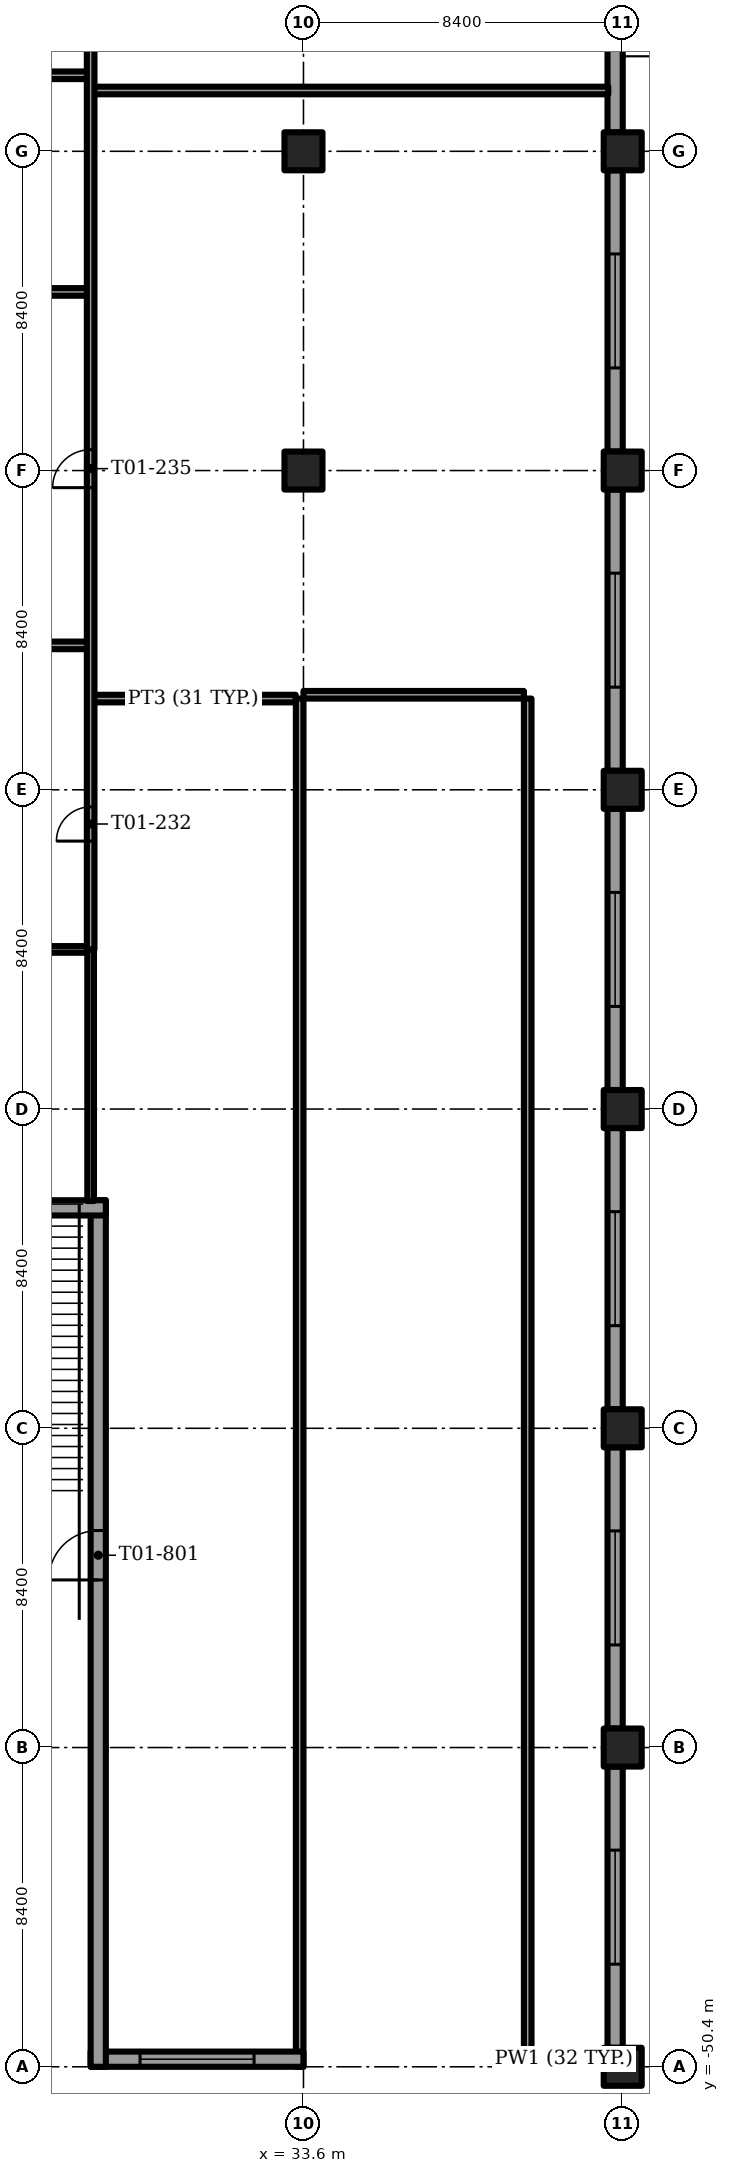
"""IFC4 building model, lengths in metres.
Left out: names, types, materials, properties, quantities, classifications, styles, units other than length and angle.
Written with IfcOpenShell. Run it as: python <this file> out.ifc"""

import sys

from ifc_helpers import new_model, si_unit, direction, frame, frame_2d, origin, origin_2d, place, context, subcontext, project, spatial, rectangle, extrude, element, fill, save


model = new_model("IFC4")
c1 = context("Model", 3, precision=1e-05, world=origin(), true_north=direction((0.0, 1.0)))
c2 = subcontext(c1, "Body", "Model", "MODEL_VIEW")
j1 = project(units=[si_unit("LENGTHUNIT", "METRE"), si_unit("PLANEANGLEUNIT", "RADIAN")], contexts=[c1])
p1 = place(None, origin())
s1 = spatial("IfcSite", under=j1, at=p1, CompositionType="ELEMENT")
p2 = place(p1, origin())
s2 = spatial("IfcBuilding", under=s1, at=p2, CompositionType="ELEMENT")
p3 = place(p2, frame((0.0, 0.0, 6.0)))
s3 = spatial("IfcBuildingStorey", under=s2, at=p3, CompositionType="ELEMENT", Elevation=6.0)
for number, where, z_axis, x_axis in (
    (1, (33.6, -8.4, -0.35), (0.0, 0.0, 1.0), (1.0, 0.0, 0.0)),
    (2, (33.6, 0.0, -0.35), (0.0, 0.0, 1.0), (1.0, 0.0, 0.0)),
    (3, (42.0, -50.4, -0.35), (0.0, 0.0, 1.0), (1.0, 0.0, 0.0)),
    (4, (42.0, -42.0, -0.35), (0.0, 0.0, 1.0), (1.0, 0.0, 0.0)),
    (5, (42.0, -33.6, -0.35), (0.0, 0.0, 1.0), (1.0, 0.0, 0.0)),
    (6, (42.0, -25.2, -0.35), (0.0, 0.0, 1.0), (1.0, 0.0, 0.0)),
    (7, (42.0, -16.8, -0.35), (0.0, 0.0, 1.0), (1.0, 0.0, 0.0)),
    (8, (42.0, -8.4, -0.35), (0.0, 0.0, 1.0), (1.0, 0.0, 0.0)),
    (9, (42.0, 0.0, -0.35), (0.0, 0.0, 1.0), (1.0, 0.0, 0.0)),
):
    element("IfcColumn", number, at=place(p3, frame(where, z_axis=z_axis, x_axis=x_axis)), inside=s3, PredefinedType="COLUMN", context=c2, shape_type="SweptSolid", body=[
        extrude(rectangle(XDim=1.0, YDim=1.0, at=origin_2d()), origin(), (0.0, 0.0, 1.0), 4.0),
    ])
p4 = place(p3, frame((41.5, -50.2, 0.0), z_axis=(0.0, 0.0, 1.0), x_axis=(-1.0, 0.0, 0.0)))
e10 = element("IfcWall", 10, at=p4, inside=s3, PredefinedType="SOLIDWALL", context=c2, shape_type="SweptSolid", body=[
    extrude(rectangle(XDim=2.1, YDim=0.4, at=frame_2d((1.05, 0.0))), origin(), (0.0, 0.0, 1.0), 3.65),
])
p5 = place(p3, frame((33.6, -50.2, 0.0), z_axis=(0.0, 0.0, 1.0), x_axis=(-1.0, 0.0, 0.0)))
e11 = element("IfcWall", 11, at=p5, inside=s3, PredefinedType="SOLIDWALL", context=c2, shape_type="SweptSolid", body=[
    extrude(rectangle(XDim=5.6, YDim=0.4, at=frame_2d((2.8, 0.0))), origin(), (0.0, 0.0, 1.0), 3.65),
])
p6 = place(p5, frame((1.3, 0.0, 1.0)))
e12 = element("IfcOpeningElement", 12, at=p6, cuts=e11, PredefinedType="OPENING", context=c2, shape_type="SweptSolid", body=[
    extrude(rectangle(XDim=3.0, YDim=2.2, at=frame_2d((1.5, 1.1))), frame((0.0, 0.2, 0.0), z_axis=(0.0, -1.0, 0.0), x_axis=(1.0, 0.0, 0.0)), (0.0, 0.0, 1.0), 0.4),
])
p7 = place(p3, frame((41.8, 7.9, 0.0), z_axis=(0.0, 0.0, 1.0), x_axis=(0.0, -1.0, 0.0)))
e13 = element("IfcWall", 13, at=p7, inside=s3, PredefinedType="SOLIDWALL", context=c2, shape_type="SweptSolid", body=[
    extrude(rectangle(XDim=7.4, YDim=0.4, at=frame_2d((3.7, 0.0))), origin(), (0.0, 0.0, 1.0), 3.65),
])
p8 = place(p7, frame((2.2, 0.0, 1.0)))
e14 = element("IfcOpeningElement", 14, at=p8, cuts=e13, PredefinedType="OPENING", context=c2, shape_type="SweptSolid", body=[
    extrude(rectangle(XDim=3.0, YDim=2.2, at=frame_2d((1.5, 1.1))), frame((0.0, 0.2, 0.0), z_axis=(0.0, -1.0, 0.0), x_axis=(1.0, 0.0, 0.0)), (0.0, 0.0, 1.0), 0.4),
])
p9 = place(p3, frame((41.8, -0.5, 0.0), z_axis=(0.0, 0.0, 1.0), x_axis=(0.0, -1.0, 0.0)))
e15 = element("IfcWall", 15, at=p9, inside=s3, PredefinedType="SOLIDWALL", context=c2, shape_type="SweptSolid", body=[
    extrude(rectangle(XDim=7.4, YDim=0.4, at=frame_2d((3.7, 0.0))), origin(), (0.0, 0.0, 1.0), 3.65),
])
p10 = place(p9, frame((2.2, 0.0, 1.0)))
e16 = element("IfcOpeningElement", 16, at=p10, cuts=e15, PredefinedType="OPENING", context=c2, shape_type="SweptSolid", body=[
    extrude(rectangle(XDim=3.0, YDim=2.2, at=frame_2d((1.5, 1.1))), frame((0.0, 0.2, 0.0), z_axis=(0.0, -1.0, 0.0), x_axis=(1.0, 0.0, 0.0)), (0.0, 0.0, 1.0), 0.4),
])
p11 = place(p3, frame((41.8, -8.9, 0.0), z_axis=(0.0, 0.0, 1.0), x_axis=(0.0, -1.0, 0.0)))
e17 = element("IfcWall", 17, at=p11, inside=s3, PredefinedType="SOLIDWALL", context=c2, shape_type="SweptSolid", body=[
    extrude(rectangle(XDim=7.4, YDim=0.4, at=frame_2d((3.7, 0.0))), origin(), (0.0, 0.0, 1.0), 3.65),
])
p12 = place(p11, frame((2.2, 0.0, 1.0)))
e18 = element("IfcOpeningElement", 18, at=p12, cuts=e17, PredefinedType="OPENING", context=c2, shape_type="SweptSolid", body=[
    extrude(rectangle(XDim=3.0, YDim=2.2, at=frame_2d((1.5, 1.1))), frame((0.0, 0.2, 0.0), z_axis=(0.0, -1.0, 0.0), x_axis=(1.0, 0.0, 0.0)), (0.0, 0.0, 1.0), 0.4),
])
p13 = place(p3, frame((41.8, -17.3, 0.0), z_axis=(0.0, 0.0, 1.0), x_axis=(0.0, -1.0, 0.0)))
e19 = element("IfcWall", 19, at=p13, inside=s3, PredefinedType="SOLIDWALL", context=c2, shape_type="SweptSolid", body=[
    extrude(rectangle(XDim=7.4, YDim=0.4, at=frame_2d((3.7, 0.0))), origin(), (0.0, 0.0, 1.0), 3.65),
])
p14 = place(p13, frame((2.2, 0.0, 1.0)))
e20 = element("IfcOpeningElement", 20, at=p14, cuts=e19, PredefinedType="OPENING", context=c2, shape_type="SweptSolid", body=[
    extrude(rectangle(XDim=3.0, YDim=2.2, at=frame_2d((1.5, 1.1))), frame((0.0, 0.2, 0.0), z_axis=(0.0, -1.0, 0.0), x_axis=(1.0, 0.0, 0.0)), (0.0, 0.0, 1.0), 0.4),
])
p15 = place(p3, frame((41.8, -25.7, 0.0), z_axis=(0.0, 0.0, 1.0), x_axis=(0.0, -1.0, 0.0)))
e21 = element("IfcWall", 21, at=p15, inside=s3, PredefinedType="SOLIDWALL", context=c2, shape_type="SweptSolid", body=[
    extrude(rectangle(XDim=7.4, YDim=0.4, at=frame_2d((3.7, 0.0))), origin(), (0.0, 0.0, 1.0), 3.65),
])
p16 = place(p15, frame((2.2, 0.0, 1.0)))
e22 = element("IfcOpeningElement", 22, at=p16, cuts=e21, PredefinedType="OPENING", context=c2, shape_type="SweptSolid", body=[
    extrude(rectangle(XDim=3.0, YDim=2.2, at=frame_2d((1.5, 1.1))), frame((0.0, 0.2, 0.0), z_axis=(0.0, -1.0, 0.0), x_axis=(1.0, 0.0, 0.0)), (0.0, 0.0, 1.0), 0.4),
])
p17 = place(p3, frame((41.8, -34.1, 0.0), z_axis=(0.0, 0.0, 1.0), x_axis=(0.0, -1.0, 0.0)))
e23 = element("IfcWall", 23, at=p17, inside=s3, PredefinedType="SOLIDWALL", context=c2, shape_type="SweptSolid", body=[
    extrude(rectangle(XDim=7.4, YDim=0.4, at=frame_2d((3.7, 0.0))), origin(), (0.0, 0.0, 1.0), 3.65),
])
p18 = place(p17, frame((2.2, 0.0, 1.0)))
e24 = element("IfcOpeningElement", 24, at=p18, cuts=e23, PredefinedType="OPENING", context=c2, shape_type="SweptSolid", body=[
    extrude(rectangle(XDim=3.0, YDim=2.2, at=frame_2d((1.5, 1.1))), frame((0.0, 0.2, 0.0), z_axis=(0.0, -1.0, 0.0), x_axis=(1.0, 0.0, 0.0)), (0.0, 0.0, 1.0), 0.4),
])
p19 = place(p3, frame((41.8, -42.5, 0.0), z_axis=(0.0, 0.0, 1.0), x_axis=(0.0, -1.0, 0.0)))
e25 = element("IfcWall", 25, at=p19, inside=s3, PredefinedType="SOLIDWALL", context=c2, shape_type="SweptSolid", body=[
    extrude(rectangle(XDim=7.4, YDim=0.4, at=frame_2d((3.7, 0.0))), origin(), (0.0, 0.0, 1.0), 3.65),
])
p20 = place(p19, frame((2.2, 0.0, 1.0)))
e26 = element("IfcOpeningElement", 26, at=p20, cuts=e25, PredefinedType="OPENING", context=c2, shape_type="SweptSolid", body=[
    extrude(rectangle(XDim=3.0, YDim=2.2, at=frame_2d((1.5, 1.1))), frame((0.0, 0.2, 0.0), z_axis=(0.0, -1.0, 0.0), x_axis=(1.0, 0.0, 0.0)), (0.0, 0.0, 1.0), 0.4),
])
p21 = place(p3, frame((28.2, -50.4, 0.0), z_axis=(0.0, 0.0, 1.0), x_axis=(0.0, 1.0, 0.0)))
e27 = element("IfcWall", 27, at=p21, inside=s3, PredefinedType="SOLIDWALL", context=c2, shape_type="SweptSolid", body=[
    extrude(rectangle(XDim=22.8, YDim=0.4, at=frame_2d((11.4, 0.0))), origin(), (0.0, 0.0, 1.0), 3.65),
])
p22 = place(p21, frame((12.81, 0.0, 0.0)))
e28 = element("IfcOpeningElement", 28, at=p22, cuts=e27, PredefinedType="OPENING", context=c2, shape_type="SweptSolid", body=[
    extrude(rectangle(XDim=1.3, YDim=2.4, at=frame_2d((0.65, 1.2))), frame((0.0, 0.2, 0.0), z_axis=(0.0, -1.0, 0.0), x_axis=(1.0, 0.0, 0.0)), (0.0, 0.0, 1.0), 0.4),
])
p23 = place(p3, frame((13.6, -27.8, 0.0), z_axis=(0.0, 0.0, 1.0), x_axis=(1.0, 0.0, 0.0)))
e29 = element("IfcWall", 29, at=p23, inside=s3, PredefinedType="SOLIDWALL", context=c2, shape_type="SweptSolid", body=[
    extrude(rectangle(XDim=14.8, YDim=0.4, at=frame_2d((7.4, 0.0))), origin(), (0.0, 0.0, 1.0), 3.65),
])
p24 = place(p3, frame((39.5, -50.4, 0.0), z_axis=(0.0, 0.0, 1.0), x_axis=(0.0, 1.0, 0.0)))
e30 = element("IfcWall", 30, at=p24, inside=s3, PredefinedType="PARAPET", context=c2, shape_type="SweptSolid", body=[
    extrude(rectangle(XDim=36.0, YDim=0.2, at=frame_2d((18.0, 0.0))), origin(), (0.0, 0.0, 1.0), 1.1),
])
p25 = place(p3, frame((39.4, -14.3, 0.0), z_axis=(0.0, 0.0, 1.0), x_axis=(-1.0, 0.0, 0.0)))
e31 = element("IfcWall", 31, at=p25, inside=s3, PredefinedType="PARAPET", context=c2, shape_type="SweptSolid", body=[
    extrude(rectangle(XDim=5.8, YDim=0.2, at=frame_2d((2.9, 0.0))), origin(), (0.0, 0.0, 1.0), 1.1),
])
p26 = place(p3, frame((33.5, -14.4, 0.0), z_axis=(0.0, 0.0, 1.0), x_axis=(0.0, -1.0, 0.0)))
e32 = element("IfcWall", 32, at=p26, inside=s3, PredefinedType="PARAPET", context=c2, shape_type="SweptSolid", body=[
    extrude(rectangle(XDim=36.0, YDim=0.2, at=frame_2d((18.0, 0.0))), origin(), (0.0, 0.0, 1.0), 1.1),
])
p27 = place(p3, frame((14.0, -21.0, 0.0), z_axis=(0.0, 0.0, 1.0), x_axis=(1.0, 0.0, 0.0)))
e33 = element("IfcWall", 33, at=p27, inside=s3, PredefinedType="PARTITIONING", context=c2, shape_type="SweptSolid", body=[
    extrude(rectangle(XDim=14.0, YDim=0.175, at=frame_2d((7.0, 0.0))), origin(), (0.0, 0.0, 1.0), 3.65),
])
p28 = place(p27, frame((6.55, 0.0, 0.0)))
e34 = element("IfcOpeningElement", 34, at=p28, cuts=e33, PredefinedType="OPENING", context=c2, shape_type="SweptSolid", body=[
    extrude(rectangle(XDim=0.9, YDim=2.1, at=frame_2d((0.45, 1.05))), frame((0.0, 0.087, 0.0), z_axis=(0.0, -1.0, 0.0), x_axis=(1.0, 0.0, 0.0)), (0.0, 0.0, 1.0), 0.175),
])
p29 = place(p3, frame((28.0, -27.62, 0.0), z_axis=(0.0, 0.0, 1.0), x_axis=(0.0, 1.0, 0.0)))
e35 = element("IfcWall", 35, at=p29, inside=s3, PredefinedType="PARTITIONING", context=c2, shape_type="SweptSolid", body=[
    extrude(rectangle(XDim=6.62, YDim=0.175, at=frame_2d((3.31, 0.0))), origin(), (0.0, 0.0, 1.0), 3.65),
])
p30 = place(p3, frame((28.0, -14.4, 0.0), z_axis=(0.0, 0.0, 1.0), x_axis=(1.0, 0.0, 0.0)))
e36 = element("IfcWall", 36, at=p30, inside=s3, PredefinedType="PARTITIONING", context=c2, shape_type="SweptSolid", body=[
    extrude(rectangle(XDim=5.395, YDim=0.2, at=frame_2d((2.698, 0.0))), origin(), (0.0, 0.0, 1.0), 3.65),
])
for number, where, z_axis, x_axis in (
    (37, (14.0, -13.0, 0.0), (0.0, 0.0, 1.0), (1.0, 0.0, 0.0)),
    (38, (14.0, -3.7, 0.0), (0.0, 0.0, 1.0), (1.0, 0.0, 0.0)),
):
    element("IfcWall", number, at=place(p3, frame(where, z_axis=z_axis, x_axis=x_axis)), inside=s3, PredefinedType="PARTITIONING", context=c2, shape_type="SweptSolid", body=[
        extrude(rectangle(XDim=14.0, YDim=0.2, at=frame_2d((7.0, 0.0))), origin(), (0.0, 0.0, 1.0), 2.8),
    ])
p31 = place(p3, frame((28.0, 1.6, 0.0), z_axis=(0.0, 0.0, 1.0), x_axis=(1.0, 0.0, 0.0)))
e39 = element("IfcWall", 39, at=p31, inside=s3, PredefinedType="PARTITIONING", context=c2, shape_type="SweptSolid", body=[
    extrude(rectangle(XDim=13.62, YDim=0.2, at=frame_2d((6.81, 0.0))), origin(), (0.0, 0.0, 1.0), 3.65),
])
p32 = place(p3, frame((14.0, 2.0, 0.0), z_axis=(0.0, 0.0, 1.0), x_axis=(1.0, 0.0, 0.0)))
e40 = element("IfcWall", 40, at=p32, inside=s3, PredefinedType="PARTITIONING", context=c2, shape_type="SweptSolid", body=[
    extrude(rectangle(XDim=14.0, YDim=0.2, at=frame_2d((7.0, 0.0))), origin(), (0.0, 0.0, 1.0), 2.8),
])
p33 = place(p3, frame((28.0, -21.0, 0.0), z_axis=(0.0, 0.0, 1.0), x_axis=(0.0, 1.0, 0.0)))
e41 = element("IfcWall", 41, at=p33, inside=s3, PredefinedType="PARTITIONING", context=c2, shape_type="SweptSolid", body=[
    extrude(rectangle(XDim=37.8, YDim=0.2, at=frame_2d((18.9, 0.0))), origin(), (0.0, 0.0, 1.0), 3.65),
])
p34 = place(p33, frame((2.85, 0.0, 0.0)))
e42 = element("IfcOpeningElement", 42, at=p34, cuts=e41, PredefinedType="OPENING", context=c2, shape_type="SweptSolid", body=[
    extrude(rectangle(XDim=0.9, YDim=2.1, at=frame_2d((0.45, 1.05))), frame((0.0, 0.1, 0.0), z_axis=(0.0, -1.0, 0.0), x_axis=(1.0, 0.0, 0.0)), (0.0, 0.0, 1.0), 0.2),
])
p35 = place(p33, frame((12.15, 0.0, 0.0)))
e43 = element("IfcOpeningElement", 43, at=p35, cuts=e41, PredefinedType="OPENING", context=c2, shape_type="SweptSolid", body=[
    extrude(rectangle(XDim=1.0, YDim=2.1, at=frame_2d((0.5, 1.05))), frame((0.0, 0.1, 0.0), z_axis=(0.0, -1.0, 0.0), x_axis=(1.0, 0.0, 0.0)), (0.0, 0.0, 1.0), 0.2),
])
p36 = place(p6, origin())
e44 = element("IfcWindow", 44, at=p36, inside=s3, PartitioningType="SINGLE_PANEL", PredefinedType="WINDOW", context=c2, shape_type="SweptSolid", body=[
    extrude(rectangle(XDim=3.0, YDim=2.2, at=frame_2d((1.5, 1.1))), frame((0.0, 0.03, 0.0), z_axis=(0.0, -1.0, 0.0), x_axis=(1.0, 0.0, 0.0)), (0.0, 0.0, 1.0), 0.06),
])
fill(e12, e44)
p37 = place(p10, origin())
e45 = element("IfcWindow", 45, at=p37, inside=s3, PartitioningType="SINGLE_PANEL", PredefinedType="WINDOW", context=c2, shape_type="SweptSolid", body=[
    extrude(rectangle(XDim=3.0, YDim=2.2, at=frame_2d((1.5, 1.1))), frame((0.0, 0.03, 0.0), z_axis=(0.0, -1.0, 0.0), x_axis=(1.0, 0.0, 0.0)), (0.0, 0.0, 1.0), 0.06),
])
fill(e16, e45)
p38 = place(p12, origin())
e46 = element("IfcWindow", 46, at=p38, inside=s3, PartitioningType="SINGLE_PANEL", PredefinedType="WINDOW", context=c2, shape_type="SweptSolid", body=[
    extrude(rectangle(XDim=3.0, YDim=2.2, at=frame_2d((1.5, 1.1))), frame((0.0, 0.03, 0.0), z_axis=(0.0, -1.0, 0.0), x_axis=(1.0, 0.0, 0.0)), (0.0, 0.0, 1.0), 0.06),
])
fill(e18, e46)
p39 = place(p14, origin())
e47 = element("IfcWindow", 47, at=p39, inside=s3, PartitioningType="SINGLE_PANEL", PredefinedType="WINDOW", context=c2, shape_type="SweptSolid", body=[
    extrude(rectangle(XDim=3.0, YDim=2.2, at=frame_2d((1.5, 1.1))), frame((0.0, 0.03, 0.0), z_axis=(0.0, -1.0, 0.0), x_axis=(1.0, 0.0, 0.0)), (0.0, 0.0, 1.0), 0.06),
])
fill(e20, e47)
p40 = place(p16, origin())
e48 = element("IfcWindow", 48, at=p40, inside=s3, PartitioningType="SINGLE_PANEL", PredefinedType="WINDOW", context=c2, shape_type="SweptSolid", body=[
    extrude(rectangle(XDim=3.0, YDim=2.2, at=frame_2d((1.5, 1.1))), frame((0.0, 0.03, 0.0), z_axis=(0.0, -1.0, 0.0), x_axis=(1.0, 0.0, 0.0)), (0.0, 0.0, 1.0), 0.06),
])
fill(e22, e48)
p41 = place(p18, origin())
e49 = element("IfcWindow", 49, at=p41, inside=s3, PartitioningType="SINGLE_PANEL", PredefinedType="WINDOW", context=c2, shape_type="SweptSolid", body=[
    extrude(rectangle(XDim=3.0, YDim=2.2, at=frame_2d((1.5, 1.1))), frame((0.0, 0.03, 0.0), z_axis=(0.0, -1.0, 0.0), x_axis=(1.0, 0.0, 0.0)), (0.0, 0.0, 1.0), 0.06),
])
fill(e24, e49)
p42 = place(p20, origin())
e50 = element("IfcWindow", 50, at=p42, inside=s3, PartitioningType="SINGLE_PANEL", PredefinedType="WINDOW", context=c2, shape_type="SweptSolid", body=[
    extrude(rectangle(XDim=3.0, YDim=2.2, at=frame_2d((1.5, 1.1))), frame((0.0, 0.03, 0.0), z_axis=(0.0, -1.0, 0.0), x_axis=(1.0, 0.0, 0.0)), (0.0, 0.0, 1.0), 0.06),
])
fill(e26, e50)
p43 = place(p22, origin())
e51 = element("IfcDoor", 51, at=p43, inside=s3, OperationType="SINGLE_SWING_LEFT", PredefinedType="DOOR", context=c2, shape_type="SweptSolid", body=[
    extrude(rectangle(XDim=1.3, YDim=2.4, at=frame_2d((0.65, 1.2))), frame((0.0, 0.025, 0.0), z_axis=(0.0, -1.0, 0.0), x_axis=(1.0, 0.0, 0.0)), (0.0, 0.0, 1.0), 0.05),
])
fill(e28, e51)
p44 = place(p34, origin())
e52 = element("IfcDoor", 52, at=p44, inside=s3, OperationType="SINGLE_SWING_RIGHT", PredefinedType="DOOR", context=c2, shape_type="SweptSolid", body=[
    extrude(rectangle(XDim=0.9, YDim=2.1, at=frame_2d((0.45, 1.05))), frame((0.0, 0.025, 0.0), z_axis=(0.0, -1.0, 0.0), x_axis=(1.0, 0.0, 0.0)), (0.0, 0.0, 1.0), 0.05),
])
fill(e42, e52)
p45 = place(p35, origin())
e53 = element("IfcDoor", 53, at=p45, inside=s3, OperationType="SINGLE_SWING_LEFT", PredefinedType="DOOR", context=c2, shape_type="SweptSolid", body=[
    extrude(rectangle(XDim=1.0, YDim=2.1, at=frame_2d((0.5, 1.05))), frame((0.0, 0.025, 0.0), z_axis=(0.0, -1.0, 0.0), x_axis=(1.0, 0.0, 0.0)), (0.0, 0.0, 1.0), 0.05),
])
fill(e43, e53)
save(model, sys.argv[1])
